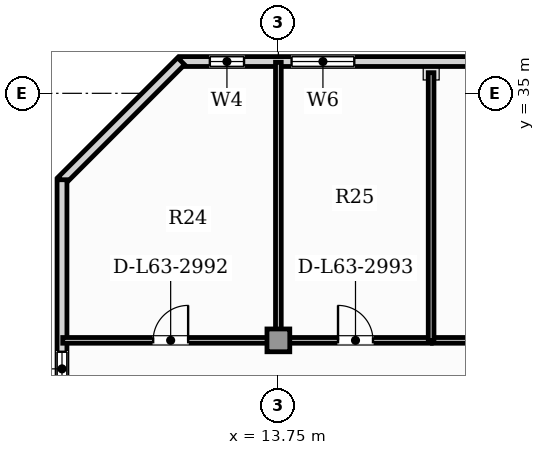
"""IFC4 building model, lengths in metres.
Left out: names, types, materials, properties, quantities, classifications, styles, units other than length and angle.
Written with IfcOpenShell. Run it as: python <this file> out.ifc"""

import sys

from ifc_helpers import new_model, si_unit, direction, frame, frame_2d, origin, origin_2d, place, context, subcontext, project, spatial, rectangle, extrude, element, fill, save


model = new_model("IFC4")
c1 = context("Model", 3, precision=1e-05, world=origin(), true_north=direction((0.0, 1.0)))
c2 = subcontext(c1, "Body", "Model", "MODEL_VIEW")
j1 = project(units=[si_unit("LENGTHUNIT", "METRE"), si_unit("PLANEANGLEUNIT", "RADIAN")], contexts=[c1])
p1 = place(None, origin())
s1 = spatial("IfcSite", under=j1, at=p1, CompositionType="ELEMENT")
p2 = place(p1, origin())
s2 = spatial("IfcBuilding", under=s1, at=p2, CompositionType="ELEMENT")
p3 = place(p2, frame((0.0, 0.0, 256.75)))
s3 = spatial("IfcBuildingStorey", under=s2, at=p3, CompositionType="ELEMENT", Elevation=256.75)
p4 = place(p3, frame((13.75, 28.5, 0.0), z_axis=(0.0, 0.0, 1.0), x_axis=(1.0, 0.0, 0.0)))
e1 = element("IfcColumn", 1, at=p4, inside=s3, PredefinedType="COLUMN", context=c2, shape_type="SweptSolid", body=[
    extrude(rectangle(XDim=0.6, YDim=0.6, at=origin_2d()), origin(), (0.0, 0.0, 1.0), 3.85),
])
p5 = place(p3, frame((21.71, 35.836, 0.0), z_axis=(0.0, 0.0, 1.0), x_axis=(-1.0, 0.0, 0.0)))
e2 = element("IfcWall", 2, at=p5, inside=s3, PredefinedType="SOLIDWALL", context=c2, shape_type="SweptSolid", body=[
    extrude(rectangle(XDim=10.543, YDim=0.26, at=frame_2d((5.272, 0.0))), origin(), (0.0, 0.0, 1.0), 3.65),
])
p6 = place(p5, frame((8.863, 0.0, 0.95)))
e3 = element("IfcOpeningElement", 3, at=p6, cuts=e2, PredefinedType="OPENING", context=c2, shape_type="SweptSolid", body=[
    extrude(rectangle(XDim=0.9, YDim=1.5, at=frame_2d((0.45, 0.75))), frame((0.0, 0.14, 0.0), z_axis=(0.0, -1.0, 0.0), x_axis=(1.0, 0.0, 0.0)), (0.0, 0.0, 1.0), 0.28),
])
p7 = place(p5, frame((5.963, 0.0, 0.88)))
e4 = element("IfcOpeningElement", 4, at=p7, cuts=e2, PredefinedType="OPENING", context=c2, shape_type="SweptSolid", body=[
    extrude(rectangle(XDim=1.65, YDim=2.0, at=frame_2d((0.825, 1.0))), frame((0.0, 0.14, 0.0), z_axis=(0.0, -1.0, 0.0), x_axis=(1.0, 0.0, 0.0)), (0.0, 0.0, 1.0), 0.28),
])
p8 = place(p3, frame((11.19, 35.846, 0.0), z_axis=(0.0, 0.0, 1.0), x_axis=(-0.707079321262, -0.707134240044, 0.0)))
e5 = element("IfcWall", 5, at=p8, inside=s3, PredefinedType="SOLIDWALL", context=c2, shape_type="SweptSolid", body=[
    extrude(rectangle(XDim=4.446, YDim=0.26, at=frame_2d((2.223, 0.0))), origin(), (0.0, 0.0, 1.0), 3.65),
])
p9 = place(p3, frame((8.057, 32.726, 0.0), z_axis=(0.0, 0.0, 1.0), x_axis=(0.0, -1.0, 0.0)))
e6 = element("IfcWall", 6, at=p9, inside=s3, PredefinedType="SOLIDWALL", context=c2, shape_type="SweptSolid", body=[
    extrude(rectangle(XDim=29.486, YDim=0.26, at=frame_2d((14.743, 0.0))), origin(), (0.0, 0.0, 1.0), 3.19),
])
p10 = place(p9, frame((24.186, 0.0, 0.85)))
e7 = element("IfcOpeningElement", 7, at=p10, cuts=e6, PredefinedType="OPENING", context=c2, shape_type="SweptSolid", body=[
    extrude(rectangle(XDim=0.9, YDim=1.4, at=frame_2d((0.45, 0.7))), frame((0.0, 0.14, 0.0), z_axis=(0.0, -1.0, 0.0), x_axis=(1.0, 0.0, 0.0)), (0.0, 0.0, 1.0), 0.28),
])
p11 = place(p9, frame((4.526, 0.0, 0.85)))
e8 = element("IfcOpeningElement", 8, at=p11, cuts=e6, PredefinedType="OPENING", context=c2, shape_type="SweptSolid", body=[
    extrude(rectangle(XDim=0.9, YDim=1.4, at=frame_2d((0.45, 0.7))), frame((0.0, 0.14, 0.0), z_axis=(0.0, -1.0, 0.0), x_axis=(1.0, 0.0, 0.0)), (0.0, 0.0, 1.0), 0.28),
])
p12 = place(p9, frame((15.108, 0.0, 0.85)))
e9 = element("IfcOpeningElement", 9, at=p12, cuts=e6, PredefinedType="OPENING", context=c2, shape_type="SweptSolid", body=[
    extrude(rectangle(XDim=0.9, YDim=1.4, at=frame_2d((0.45, 0.7))), frame((0.0, 0.14, 0.0), z_axis=(0.0, -1.0, 0.0), x_axis=(1.0, 0.0, 0.0)), (0.0, 0.0, 1.0), 0.28),
])
p13 = place(p9, frame((9.501, 0.0, 0.85)))
e10 = element("IfcOpeningElement", 10, at=p13, cuts=e6, PredefinedType="OPENING", context=c2, shape_type="SweptSolid", body=[
    extrude(rectangle(XDim=0.9, YDim=1.4, at=frame_2d((0.45, 0.7))), frame((0.0, 0.14, 0.0), z_axis=(0.0, -1.0, 0.0), x_axis=(1.0, 0.0, 0.0)), (0.0, 0.0, 1.0), 0.28),
])
p14 = place(p3, frame((8.076, 28.5, 0.0), z_axis=(0.0, 0.0, 1.0), x_axis=(1.0, 0.0, 0.0)))
e11 = element("IfcWall", 11, at=p14, inside=s3, PredefinedType="PARTITIONING", context=c2, shape_type="SweptSolid", body=[
    extrude(rectangle(XDim=5.679, YDim=0.15, at=frame_2d((2.839, 0.0))), origin(), (0.0, 0.0, 1.0), 3.65),
])
p15 = place(p14, frame((2.379, 0.0, 0.0)))
e12 = element("IfcOpeningElement", 12, at=p15, cuts=e11, PredefinedType="OPENING", context=c2, shape_type="SweptSolid", body=[
    extrude(rectangle(XDim=0.92, YDim=2.1, at=frame_2d((0.46, 1.05))), frame((0.0, 0.085, 0.0), z_axis=(0.0, -1.0, 0.0), x_axis=(1.0, 0.0, 0.0)), (0.0, 0.0, 1.0), 0.17),
])
p16 = place(p3, frame((13.785, 28.5, 0.0), z_axis=(0.0, 0.0, 1.0), x_axis=(1.0, 0.0, 0.0)))
e13 = element("IfcWall", 13, at=p16, inside=s3, PredefinedType="PARTITIONING", context=c2, shape_type="SweptSolid", body=[
    extrude(rectangle(XDim=3.989, YDim=0.15, at=frame_2d((1.994, 0.0))), origin(), (0.0, 0.0, 1.0), 3.105),
])
p17 = place(p16, frame((1.534, 0.0, 0.0)))
e14 = element("IfcOpeningElement", 14, at=p17, cuts=e13, PredefinedType="OPENING", context=c2, shape_type="SweptSolid", body=[
    extrude(rectangle(XDim=0.92, YDim=2.1, at=frame_2d((0.46, 1.05))), frame((0.0, 0.085, 0.0), z_axis=(0.0, -1.0, 0.0), x_axis=(1.0, 0.0, 0.0)), (0.0, 0.0, 1.0), 0.17),
])
p18 = place(p3, frame((17.804, 28.5, 0.0), z_axis=(0.0, 0.0, 1.0), x_axis=(1.0, 0.0, 0.0)))
e15 = element("IfcWall", 15, at=p18, inside=s3, PredefinedType="PARTITIONING", context=c2, shape_type="SweptSolid", body=[
    extrude(rectangle(XDim=3.741, YDim=0.15, at=frame_2d((1.871, 0.0))), origin(), (0.0, 0.0, 1.0), 3.105),
])
p19 = place(p18, frame((1.411, 0.0, 0.0)))
e16 = element("IfcOpeningElement", 16, at=p19, cuts=e15, PredefinedType="OPENING", context=c2, shape_type="SweptSolid", body=[
    extrude(rectangle(XDim=0.92, YDim=2.1, at=frame_2d((0.46, 1.05))), frame((0.0, 0.085, 0.0), z_axis=(0.0, -1.0, 0.0), x_axis=(1.0, 0.0, 0.0)), (0.0, 0.0, 1.0), 0.17),
])
p20 = place(p3, frame((13.75, 28.495, 0.0), z_axis=(0.0, 0.0, 1.0), x_axis=(0.0, 1.0, 0.0)))
e17 = element("IfcWall", 17, at=p20, inside=s3, PredefinedType="PARTITIONING", context=c2, shape_type="SweptSolid", body=[
    extrude(rectangle(XDim=7.322, YDim=0.15, at=frame_2d((3.661, 0.0))), origin(), (0.0, 0.0, 1.0), 3.65),
])
p21 = place(p3, frame((17.769, 28.495, 0.0), z_axis=(0.0, 0.0, 1.0), x_axis=(0.0, 1.0, 0.0)))
e18 = element("IfcWall", 18, at=p21, inside=s3, PredefinedType="PARTITIONING", context=c2, shape_type="SweptSolid", body=[
    extrude(rectangle(XDim=7.048, YDim=0.15, at=frame_2d((3.524, 0.0))), origin(), (0.0, 0.0, 1.0), 3.65),
])
p22 = place(p11, origin())
e19 = element("IfcWindow", 19, at=p22, inside=s3, PartitioningType="SINGLE_PANEL", PredefinedType="WINDOW", context=c2, shape_type="SweptSolid", body=[
    extrude(rectangle(XDim=0.9, YDim=1.4, at=frame_2d((0.45, 0.7))), frame((0.0, 0.03, 0.0), z_axis=(0.0, -1.0, 0.0), x_axis=(1.0, 0.0, 0.0)), (0.0, 0.0, 1.0), 0.06),
])
fill(e8, e19)
p23 = place(p6, origin())
e20 = element("IfcWindow", 20, at=p23, inside=s3, PartitioningType="SINGLE_PANEL", PredefinedType="WINDOW", context=c2, shape_type="SweptSolid", body=[
    extrude(rectangle(XDim=0.9, YDim=1.5, at=frame_2d((0.45, 0.75))), frame((0.0, 0.03, 0.0), z_axis=(0.0, -1.0, 0.0), x_axis=(1.0, 0.0, 0.0)), (0.0, 0.0, 1.0), 0.06),
])
fill(e3, e20)
p24 = place(p7, origin())
e21 = element("IfcWindow", 21, at=p24, inside=s3, PartitioningType="SINGLE_PANEL", PredefinedType="WINDOW", context=c2, shape_type="SweptSolid", body=[
    extrude(rectangle(XDim=1.65, YDim=2.0, at=frame_2d((0.825, 1.0))), frame((0.0, 0.03, 0.0), z_axis=(0.0, -1.0, 0.0), x_axis=(1.0, 0.0, 0.0)), (0.0, 0.0, 1.0), 0.06),
])
fill(e4, e21)
p25 = place(p15, origin())
e22 = element("IfcDoor", 22, at=p25, inside=s3, OperationType="SINGLE_SWING_RIGHT", PredefinedType="DOOR", context=c2, shape_type="SweptSolid", body=[
    extrude(rectangle(XDim=0.92, YDim=2.1, at=frame_2d((0.46, 1.05))), frame((0.0, 0.025, 0.0), z_axis=(0.0, -1.0, 0.0), x_axis=(1.0, 0.0, 0.0)), (0.0, 0.0, 1.0), 0.05),
])
fill(e12, e22)
p26 = place(p17, origin())
e23 = element("IfcDoor", 23, at=p26, inside=s3, OperationType="SINGLE_SWING_LEFT", PredefinedType="DOOR", context=c2, shape_type="SweptSolid", body=[
    extrude(rectangle(XDim=0.92, YDim=2.1, at=frame_2d((0.46, 1.05))), frame((0.0, 0.025, 0.0), z_axis=(0.0, -1.0, 0.0), x_axis=(1.0, 0.0, 0.0)), (0.0, 0.0, 1.0), 0.05),
])
fill(e14, e23)
save(model, sys.argv[1])
